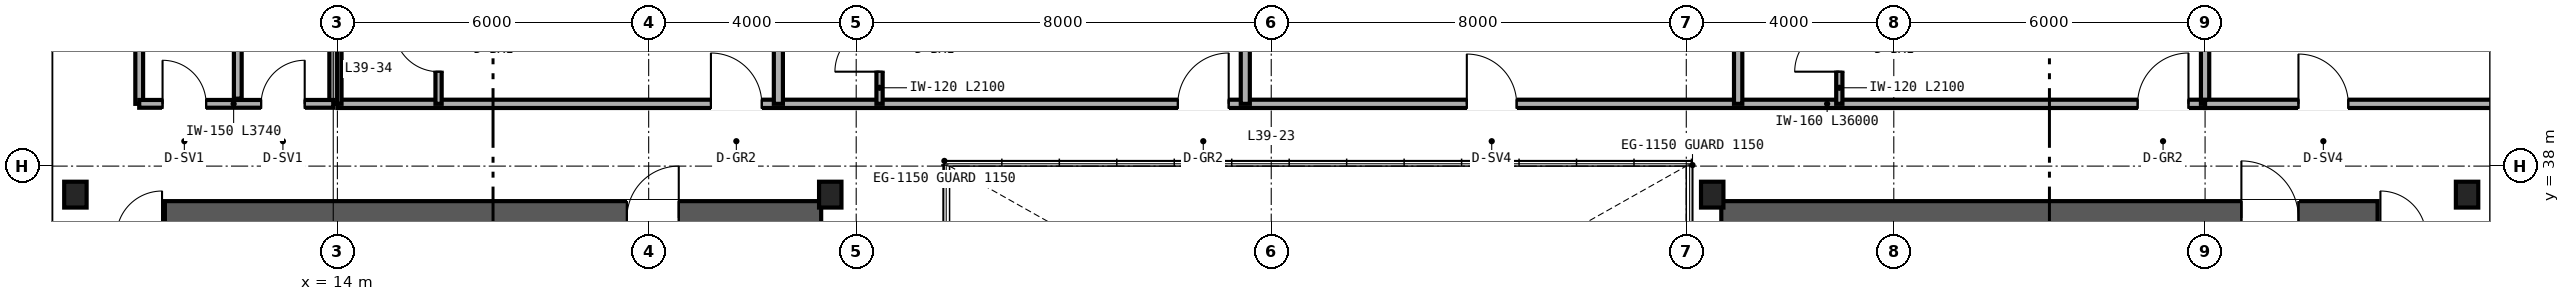
"""IFC4 building model, lengths in metres.
Left out: names, types, materials, properties, quantities, classifications, styles, units other than length and angle.
Written with IfcOpenShell. Run it as: python <this file> out.ifc"""

import sys

from ifc_helpers import new_model, si_unit, direction, frame, frame_2d, origin, origin_2d, place, context, subcontext, project, spatial, rectangle, i_section, extrude, source, transform, mapped, element, fill, save


model = new_model("IFC4")
c1 = context("Model", 3, precision=1e-05, world=origin(), true_north=direction((0.0, 1.0)))
c2 = subcontext(c1, "Body", "Model", "MODEL_VIEW")
j1 = project(units=[si_unit("LENGTHUNIT", "METRE"), si_unit("PLANEANGLEUNIT", "RADIAN")], contexts=[c1])
p1 = place(None, origin())
s1 = spatial("IfcSite", under=j1, at=p1, CompositionType="ELEMENT")
p2 = place(p1, origin())
s2 = spatial("IfcBuilding", under=s1, at=p2, CompositionType="ELEMENT")
p3 = place(p2, frame((0.0, 0.0, 158.4)))
s3 = spatial("IfcBuildingStorey", under=s2, at=p3, CompositionType="ELEMENT", Elevation=158.4)
p4 = place(p3, frame((10.675, 37.0, 0.0), z_axis=(0.0, 0.0, 1.0), x_axis=(1.0, 0.0, 0.0)))
e1 = element("IfcWall", 1, at=p4, inside=s3, PredefinedType="SHEAR", context=c2, shape_type="SweptSolid", body=[
    extrude(rectangle(XDim=12.65, YDim=0.65, at=frame_2d((6.325, 0.0))), origin(), (0.0, 0.0, 1.0), 4.57),
])
p5 = place(p4, frame((8.905, 0.0, 0.0)))
e2 = element("IfcOpeningElement", 2, at=p5, cuts=e1, PredefinedType="OPENING", context=c2, shape_type="SweptSolid", body=[
    extrude(rectangle(XDim=1.0, YDim=2.15, at=frame_2d((0.5, 1.075))), frame((0.0, 0.335, 0.0), z_axis=(0.0, -1.0, 0.0), x_axis=(1.0, 0.0, 0.0)), (0.0, 0.0, 1.0), 0.67),
])
p6 = place(p3, frame((40.675, 37.0, 0.0), z_axis=(0.0, 0.0, 1.0), x_axis=(1.0, 0.0, 0.0)))
e3 = element("IfcWall", 3, at=p6, inside=s3, PredefinedType="SHEAR", context=c2, shape_type="SweptSolid", body=[
    extrude(rectangle(XDim=12.65, YDim=0.65, at=frame_2d((6.325, 0.0))), origin(), (0.0, 0.0, 1.0), 4.57),
])
p7 = place(p6, frame((10.025, 0.0, 0.0)))
e4 = element("IfcOpeningElement", 4, at=p7, cuts=e3, PredefinedType="OPENING", context=c2, shape_type="SweptSolid", body=[
    extrude(rectangle(XDim=1.1, YDim=2.15, at=frame_2d((0.55, 1.075))), frame((0.0, 0.335, 0.0), z_axis=(0.0, -1.0, 0.0), x_axis=(1.0, 0.0, 0.0)), (0.0, 0.0, 1.0), 0.67),
])
m1 = source(origin(), c2, "Body", "SweptSolid", [
    extrude(i_section(OverallWidth=0.432, OverallDepth=0.498, WebThickness=0.056, FlangeThickness=0.089, FilletRadius=0.025, at=origin_2d()), origin(), (0.0, 0.0, 1.0), 4.57),
])
for number, where, z_axis, x_axis in (
    (5, (8.95, 37.45, 0.0), (0.0, 0.0, 1.0), (1.0, 0.0, 0.0)),
    (6, (23.5, 37.45, 0.0), (0.0, 0.0, 1.0), (1.0, 0.0, 0.0)),
    (7, (40.5, 37.45, 0.0), (0.0, 0.0, 1.0), (1.0, 0.0, 0.0)),
    (8, (55.05, 37.45, 0.0), (0.0, 0.0, 1.0), (1.0, 0.0, 0.0)),
):
    element("IfcColumn", number, at=place(p3, frame(where, z_axis=z_axis, x_axis=x_axis)), inside=s3, PredefinedType="COLUMN", context=c2, shape_type="MappedRepresentation", body=[
        mapped(m1, transform((0.0, 0.0, 0.0), scale=1.0)),
    ])
p8 = place(p3, frame((14.0, 39.2, 0.0), z_axis=(0.0, 0.0, 1.0), x_axis=(1.0, 0.0, 0.0)))
e9 = element("IfcWall", 9, at=p8, inside=s3, PredefinedType="PARTITIONING", context=c2, shape_type="SweptSolid", body=[
    extrude(rectangle(XDim=36.0, YDim=0.16, at=frame_2d((18.0, 0.0))), origin(), (0.0, 0.0, 1.0), 4.113),
])
p9 = place(p8, frame((7.2, 0.0, 0.0)))
e10 = element("IfcOpeningElement", 10, at=p9, cuts=e9, PredefinedType="OPENING", context=c2, shape_type="SweptSolid", body=[
    extrude(rectangle(XDim=0.98, YDim=2.2, at=frame_2d((0.49, 1.1))), frame((0.0, 0.09, 0.0), z_axis=(0.0, -1.0, 0.0), x_axis=(1.0, 0.0, 0.0)), (0.0, 0.0, 1.0), 0.18),
])
p10 = place(p8, frame((16.2, 0.0, 0.0)))
e11 = element("IfcOpeningElement", 11, at=p10, cuts=e9, PredefinedType="OPENING", context=c2, shape_type="SweptSolid", body=[
    extrude(rectangle(XDim=0.98, YDim=2.2, at=frame_2d((0.49, 1.1))), frame((0.0, 0.09, 0.0), z_axis=(0.0, -1.0, 0.0), x_axis=(1.0, 0.0, 0.0)), (0.0, 0.0, 1.0), 0.18),
])
p11 = place(p8, frame((21.77, 0.0, 0.0)))
e12 = element("IfcOpeningElement", 12, at=p11, cuts=e9, PredefinedType="OPENING", context=c2, shape_type="SweptSolid", body=[
    extrude(rectangle(XDim=0.96, YDim=2.15, at=frame_2d((0.48, 1.075))), frame((0.0, 0.09, 0.0), z_axis=(0.0, -1.0, 0.0), x_axis=(1.0, 0.0, 0.0)), (0.0, 0.0, 1.0), 0.18),
])
p12 = place(p8, frame((34.7, 0.0, 0.0)))
e13 = element("IfcOpeningElement", 13, at=p12, cuts=e9, PredefinedType="OPENING", context=c2, shape_type="SweptSolid", body=[
    extrude(rectangle(XDim=0.98, YDim=2.2, at=frame_2d((0.49, 1.1))), frame((0.0, 0.09, 0.0), z_axis=(0.0, -1.0, 0.0), x_axis=(1.0, 0.0, 0.0)), (0.0, 0.0, 1.0), 0.18),
])
for number, where, z_axis, x_axis in (
    (14, (14.0, 39.2, 0.0), (0.0, 0.0, 1.0), (0.0, 1.0, 0.0)),
    (15, (50.0, 39.2, 0.0), (0.0, 0.0, 1.0), (0.0, 1.0, 0.0)),
):
    element("IfcWall", number, at=place(p3, frame(where, z_axis=z_axis, x_axis=x_axis)), inside=s3, PredefinedType="PARTITIONING", context=c2, shape_type="SweptSolid", body=[
        extrude(rectangle(XDim=10.44, YDim=0.16, at=frame_2d((5.22, 0.0))), origin(), (0.0, 0.0, 1.0), 3.877),
    ])
p13 = place(p3, frame((22.5, 39.2, 0.0), z_axis=(0.0, 0.0, 1.0), x_axis=(0.0, 1.0, 0.0)))
e16 = element("IfcWall", 16, at=p13, inside=s3, PredefinedType="PARTITIONING", context=c2, shape_type="SweptSolid", body=[
    extrude(rectangle(XDim=10.44, YDim=0.175, at=frame_2d((5.22, 0.0))), origin(), (0.0, 0.0, 1.0), 4.033),
])
p14 = place(p3, frame((15.95, 39.2, 0.0), z_axis=(0.0, 0.0, 1.0), x_axis=(0.0, 1.0, 0.0)))
e17 = element("IfcWall", 17, at=p14, inside=s3, PredefinedType="PARTITIONING", context=c2, shape_type="SweptSolid", body=[
    extrude(rectangle(XDim=2.1, YDim=0.12, at=frame_2d((1.05, 0.0))), origin(), (0.0, 0.0, 1.0), 4.57),
])
p15 = place(p14, frame((0.62, 0.0, 0.0)))
e18 = element("IfcOpeningElement", 18, at=p15, cuts=e17, PredefinedType="OPENING", context=c2, shape_type="SweptSolid", body=[
    extrude(rectangle(XDim=0.86, YDim=2.1, at=frame_2d((0.43, 1.05))), frame((0.0, 0.07, 0.0), z_axis=(0.0, -1.0, 0.0), x_axis=(1.0, 0.0, 0.0)), (0.0, 0.0, 1.0), 0.14),
])
p16 = place(p3, frame((31.5, 39.2, 0.0), z_axis=(0.0, 0.0, 1.0), x_axis=(0.0, 1.0, 0.0)))
e19 = element("IfcWall", 19, at=p16, inside=s3, PredefinedType="PARTITIONING", context=c2, shape_type="SweptSolid", body=[
    extrude(rectangle(XDim=10.44, YDim=0.175, at=frame_2d((5.22, 0.0))), origin(), (0.0, 0.0, 1.0), 3.643),
])
p17 = place(p3, frame((24.45, 39.2, 0.0), z_axis=(0.0, 0.0, 1.0), x_axis=(0.0, 1.0, 0.0)))
e20 = element("IfcWall", 20, at=p17, inside=s3, PredefinedType="PARTITIONING", context=c2, shape_type="SweptSolid", body=[
    extrude(rectangle(XDim=2.1, YDim=0.12, at=frame_2d((1.05, 0.0))), origin(), (0.0, 0.0, 1.0), 4.57),
])
p18 = place(p17, frame((0.62, 0.0, 0.0)))
e21 = element("IfcOpeningElement", 21, at=p18, cuts=e20, PredefinedType="OPENING", context=c2, shape_type="SweptSolid", body=[
    extrude(rectangle(XDim=0.86, YDim=2.1, at=frame_2d((0.43, 1.05))), frame((0.0, 0.07, 0.0), z_axis=(0.0, -1.0, 0.0), x_axis=(1.0, 0.0, 0.0)), (0.0, 0.0, 1.0), 0.14),
])
p19 = place(p3, frame((41.0, 39.2, 0.0), z_axis=(0.0, 0.0, 1.0), x_axis=(0.0, 1.0, 0.0)))
e22 = element("IfcWall", 22, at=p19, inside=s3, PredefinedType="PARTITIONING", context=c2, shape_type="SweptSolid", body=[
    extrude(rectangle(XDim=10.44, YDim=0.16, at=frame_2d((5.22, 0.0))), origin(), (0.0, 0.0, 1.0), 4.033),
])
p20 = place(p3, frame((42.95, 39.2, 0.0), z_axis=(0.0, 0.0, 1.0), x_axis=(0.0, 1.0, 0.0)))
e23 = element("IfcWall", 23, at=p20, inside=s3, PredefinedType="PARTITIONING", context=c2, shape_type="SweptSolid", body=[
    extrude(rectangle(XDim=2.1, YDim=0.12, at=frame_2d((1.05, 0.0))), origin(), (0.0, 0.0, 1.0), 4.57),
])
p21 = place(p20, frame((0.62, 0.0, 0.0)))
e24 = element("IfcOpeningElement", 24, at=p21, cuts=e23, PredefinedType="OPENING", context=c2, shape_type="SweptSolid", body=[
    extrude(rectangle(XDim=0.86, YDim=2.1, at=frame_2d((0.43, 1.05))), frame((0.0, 0.07, 0.0), z_axis=(0.0, -1.0, 0.0), x_axis=(1.0, 0.0, 0.0)), (0.0, 0.0, 1.0), 0.14),
])
p22 = place(p3, frame((50.0, 39.2, 0.0), z_axis=(0.0, 0.0, 1.0), x_axis=(1.0, 0.0, 0.0)))
e25 = element("IfcWall", 25, at=p22, inside=s3, PredefinedType="PARTITIONING", context=c2, shape_type="SweptSolid", body=[
    extrude(rectangle(XDim=5.62, YDim=0.16, at=frame_2d((2.81, 0.0))), origin(), (0.0, 0.0, 1.0), 4.57),
])
p23 = place(p22, frame((1.8, 0.0, 0.0)))
e26 = element("IfcOpeningElement", 26, at=p23, cuts=e25, PredefinedType="OPENING", context=c2, shape_type="SweptSolid", body=[
    extrude(rectangle(XDim=0.96, YDim=2.15, at=frame_2d((0.48, 1.075))), frame((0.0, 0.09, 0.0), z_axis=(0.0, -1.0, 0.0), x_axis=(1.0, 0.0, 0.0)), (0.0, 0.0, 1.0), 0.18),
])
p24 = place(p3, frame((12.08, 39.3, 0.0), z_axis=(0.0, 0.0, 1.0), x_axis=(0.0, 1.0, 0.0)))
e27 = element("IfcWall", 27, at=p24, inside=s3, PredefinedType="PARTITIONING", context=c2, shape_type="SweptSolid", body=[
    extrude(rectangle(XDim=2.55, YDim=0.15, at=frame_2d((1.275, 0.0))), origin(), (0.0, 0.0, 1.0), 4.57),
])
for number, where, z_axis, x_axis in (
    (28, (10.18, 39.2, 0.0), (0.0, 0.0, 1.0), (0.0, 1.0, 0.0)),
    (29, (13.92, 39.2, 0.0), (0.0, 0.0, 1.0), (0.0, 1.0, 0.0)),
):
    element("IfcWall", number, at=place(p3, frame(where, z_axis=z_axis, x_axis=x_axis)), inside=s3, PredefinedType="PARTITIONING", context=c2, shape_type="SweptSolid", body=[
        extrude(rectangle(XDim=2.65, YDim=0.15, at=frame_2d((1.325, 0.0))), origin(), (0.0, 0.0, 1.0), 4.57),
    ])
p25 = place(p3, frame((10.18, 39.2, 0.0), z_axis=(0.0, 0.0, 1.0), x_axis=(1.0, 0.0, 0.0)))
e30 = element("IfcWall", 30, at=p25, inside=s3, PredefinedType="PARTITIONING", context=c2, shape_type="SweptSolid", body=[
    extrude(rectangle(XDim=3.74, YDim=0.15, at=frame_2d((1.87, 0.0))), origin(), (0.0, 0.0, 1.0), 4.57),
])
p26 = place(p25, frame((0.45, 0.0, 0.0)))
e31 = element("IfcOpeningElement", 31, at=p26, cuts=e30, PredefinedType="OPENING", context=c2, shape_type="SweptSolid", body=[
    extrude(rectangle(XDim=0.84, YDim=2.1, at=frame_2d((0.42, 1.05))), frame((0.0, 0.085, 0.0), z_axis=(0.0, -1.0, 0.0), x_axis=(1.0, 0.0, 0.0)), (0.0, 0.0, 1.0), 0.17),
])
p27 = place(p25, frame((2.35, 0.0, 0.0)))
e32 = element("IfcOpeningElement", 32, at=p27, cuts=e30, PredefinedType="OPENING", context=c2, shape_type="SweptSolid", body=[
    extrude(rectangle(XDim=0.84, YDim=2.1, at=frame_2d((0.42, 1.05))), frame((0.0, 0.085, 0.0), z_axis=(0.0, -1.0, 0.0), x_axis=(1.0, 0.0, 0.0)), (0.0, 0.0, 1.0), 0.17),
])
m2 = source(origin(), c2, "Body", "SweptSolid", [
    extrude(rectangle(XDim=1.0, YDim=2.15, at=frame_2d((0.5, 1.075))), frame((0.0, 0.025, 0.0), z_axis=(0.0, -1.0, 0.0), x_axis=(1.0, 0.0, 0.0)), (0.0, 0.0, 1.0), 0.05),
])
p28 = place(p5, origin())
e33 = element("IfcDoor", 33, at=p28, inside=s3, OperationType="SINGLE_SWING_RIGHT", PredefinedType="DOOR", context=c2, shape_type="MappedRepresentation", body=[
    mapped(m2, transform((0.0, 0.0, 0.0), scale=1.0)),
])
fill(e2, e33)
m3 = source(origin(), c2, "Body", "SweptSolid", [
    extrude(rectangle(XDim=1.1, YDim=2.15, at=frame_2d((0.55, 1.075))), frame((0.0, 0.025, 0.0), z_axis=(0.0, -1.0, 0.0), x_axis=(1.0, 0.0, 0.0)), (0.0, 0.0, 1.0), 0.05),
])
p29 = place(p7, origin())
e34 = element("IfcDoor", 34, at=p29, inside=s3, OperationType="SINGLE_SWING_LEFT", PredefinedType="DOOR", context=c2, shape_type="MappedRepresentation", body=[
    mapped(m3, transform((0.0, 0.0, 0.0), scale=1.0)),
])
fill(e4, e34)
m4 = source(origin(), c2, "Body", "SweptSolid", [
    extrude(rectangle(XDim=0.86, YDim=2.1, at=frame_2d((0.43, 1.05))), frame((0.0, 0.025, 0.0), z_axis=(0.0, -1.0, 0.0), x_axis=(1.0, 0.0, 0.0)), (0.0, 0.0, 1.0), 0.05),
])
p30 = place(p15, origin())
e35 = element("IfcDoor", 35, at=p30, inside=s3, OperationType="SINGLE_SWING_RIGHT", PredefinedType="DOOR", context=c2, shape_type="MappedRepresentation", body=[
    mapped(m4, transform((0.0, 0.0, 0.0), scale=1.0)),
])
fill(e18, e35)
p31 = place(p18, origin())
e36 = element("IfcDoor", 36, at=p31, inside=s3, OperationType="SINGLE_SWING_LEFT", PredefinedType="DOOR", context=c2, shape_type="MappedRepresentation", body=[
    mapped(m4, transform((0.0, 0.0, 0.0), scale=1.0)),
])
fill(e21, e36)
p32 = place(p21, origin())
e37 = element("IfcDoor", 37, at=p32, inside=s3, OperationType="SINGLE_SWING_LEFT", PredefinedType="DOOR", context=c2, shape_type="MappedRepresentation", body=[
    mapped(m4, transform((0.0, 0.0, 0.0), scale=1.0)),
])
fill(e24, e37)
m5 = source(origin(), c2, "Body", "SweptSolid", [
    extrude(rectangle(XDim=0.98, YDim=2.2, at=frame_2d((0.49, 1.1))), frame((0.0, 0.025, 0.0), z_axis=(0.0, -1.0, 0.0), x_axis=(1.0, 0.0, 0.0)), (0.0, 0.0, 1.0), 0.05),
])
p33 = place(p9, origin())
e38 = element("IfcDoor", 38, at=p33, inside=s3, OperationType="SINGLE_SWING_LEFT", PredefinedType="DOOR", context=c2, shape_type="MappedRepresentation", body=[
    mapped(m5, transform((0.0, 0.0, 0.0), scale=1.0)),
])
fill(e10, e38)
p34 = place(p10, origin())
e39 = element("IfcDoor", 39, at=p34, inside=s3, OperationType="SINGLE_SWING_RIGHT", PredefinedType="DOOR", context=c2, shape_type="MappedRepresentation", body=[
    mapped(m5, transform((0.0, 0.0, 0.0), scale=1.0)),
])
fill(e11, e39)
m6 = source(origin(), c2, "Body", "SweptSolid", [
    extrude(rectangle(XDim=0.96, YDim=2.15, at=frame_2d((0.48, 1.075))), frame((0.0, 0.025, 0.0), z_axis=(0.0, -1.0, 0.0), x_axis=(1.0, 0.0, 0.0)), (0.0, 0.0, 1.0), 0.05),
])
p35 = place(p11, origin())
e40 = element("IfcDoor", 40, at=p35, inside=s3, OperationType="SINGLE_SWING_LEFT", PredefinedType="DOOR", context=c2, shape_type="MappedRepresentation", body=[
    mapped(m6, transform((0.0, 0.0, 0.0), scale=1.0)),
])
fill(e12, e40)
p36 = place(p12, origin())
e41 = element("IfcDoor", 41, at=p36, inside=s3, OperationType="SINGLE_SWING_RIGHT", PredefinedType="DOOR", context=c2, shape_type="MappedRepresentation", body=[
    mapped(m5, transform((0.0, 0.0, 0.0), scale=1.0)),
])
fill(e13, e41)
p37 = place(p23, origin())
e42 = element("IfcDoor", 42, at=p37, inside=s3, OperationType="SINGLE_SWING_LEFT", PredefinedType="DOOR", context=c2, shape_type="MappedRepresentation", body=[
    mapped(m6, transform((0.0, 0.0, 0.0), scale=1.0)),
])
fill(e26, e42)
m7 = source(origin(), c2, "Body", "SweptSolid", [
    extrude(rectangle(XDim=0.84, YDim=2.1, at=frame_2d((0.42, 1.05))), frame((0.0, 0.025, 0.0), z_axis=(0.0, -1.0, 0.0), x_axis=(1.0, 0.0, 0.0)), (0.0, 0.0, 1.0), 0.05),
])
p38 = place(p26, origin())
e43 = element("IfcDoor", 43, at=p38, inside=s3, OperationType="SINGLE_SWING_LEFT", PredefinedType="DOOR", context=c2, shape_type="MappedRepresentation", body=[
    mapped(m7, transform((0.0, 0.0, 0.0), scale=1.0)),
])
fill(e31, e43)
p39 = place(p27, origin())
e44 = element("IfcDoor", 44, at=p39, inside=s3, OperationType="SINGLE_SWING_RIGHT", PredefinedType="DOOR", context=c2, shape_type="MappedRepresentation", body=[
    mapped(m7, transform((0.0, 0.0, 0.0), scale=1.0)),
])
fill(e32, e44)
save(model, sys.argv[1])
